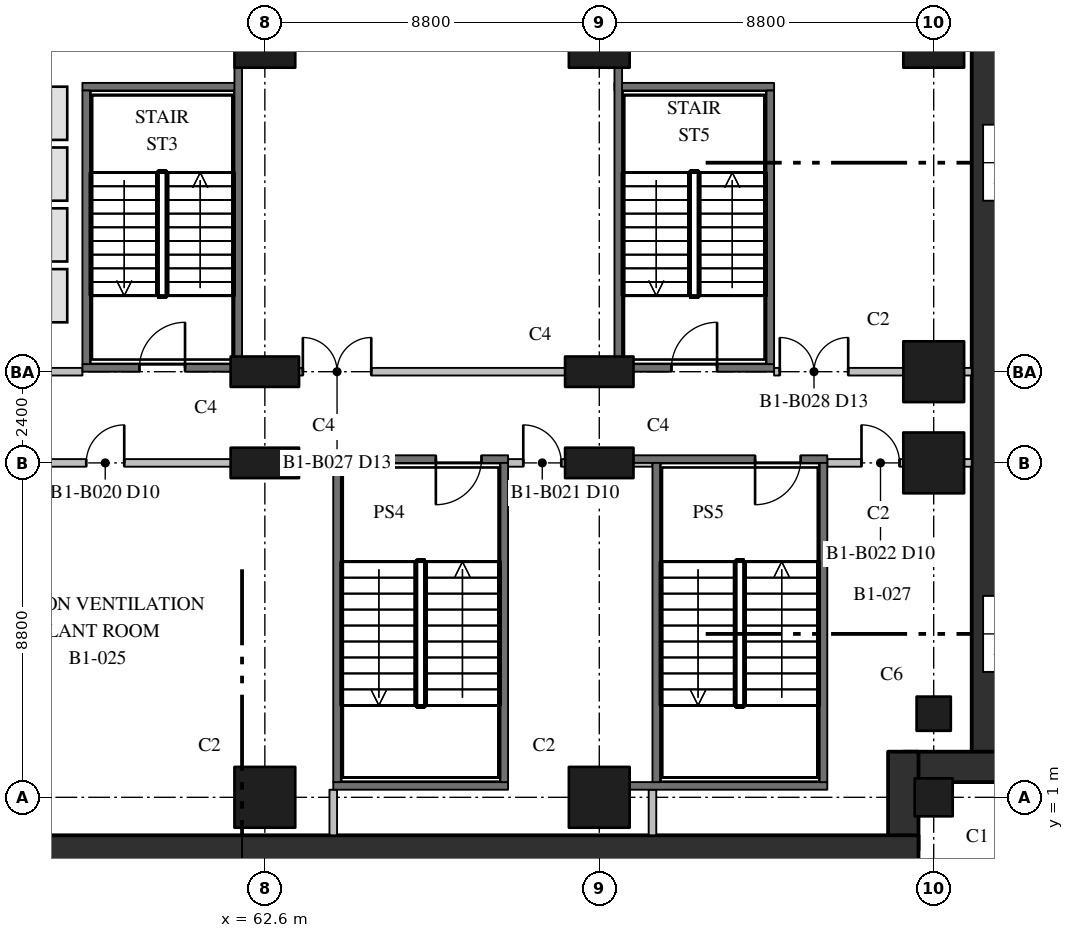
"""IFC4 building model, lengths in metres.
Left out: names, types, materials, properties, quantities, classifications, styles, units other than length and angle.
Written with IfcOpenShell. Run it as: python <this file> out.ifc"""

import sys

from ifc_helpers import new_model, si_unit, direction, frame, frame_2d, origin, origin_2d, place, context, subcontext, project, spatial, rectangle, extrude, element, fill, save


model = new_model("IFC4")
c1 = context("Model", 3, precision=1e-05, world=origin(), true_north=direction((0.0, 1.0)))
c2 = subcontext(c1, "Body", "Model", "MODEL_VIEW")
j1 = project(units=[si_unit("LENGTHUNIT", "METRE"), si_unit("PLANEANGLEUNIT", "RADIAN")], contexts=[c1])
p1 = place(None, origin())
s1 = spatial("IfcSite", under=j1, at=p1, CompositionType="ELEMENT")
p2 = place(p1, origin())
s2 = spatial("IfcBuilding", under=s1, at=p2, CompositionType="ELEMENT")
p3 = place(p2, frame((0.0, 0.0, -7.0)))
s3 = spatial("IfcBuildingStorey", under=s2, at=p3, CompositionType="ELEMENT", Elevation=-7.0)
p4 = place(p3, frame((62.6, 1.0, 0.0), z_axis=(0.0, 0.0, 1.0), x_axis=(1.0, 0.0, 0.0)))
e1 = element("IfcColumn", 1, at=p4, inside=s3, PredefinedType="COLUMN", context=c2, shape_type="SweptSolid", body=[
    extrude(rectangle(XDim=1.6, YDim=1.6, at=origin_2d()), origin(), (0.0, 0.0, 1.0), 7.0),
])
for number, where, z_axis, x_axis in (
    (2, (62.6, 9.8, 0.0), (0.0, 0.0, 1.0), (1.0, 0.0, 0.0)),
    (3, (62.6, 12.2, 0.0), (0.0, 0.0, 1.0), (1.0, 0.0, 0.0)),
):
    element("IfcColumn", number, at=place(p3, frame(where, z_axis=z_axis, x_axis=x_axis)), inside=s3, PredefinedType="COLUMN", context=c2, shape_type="SweptSolid", body=[
        extrude(rectangle(XDim=1.8, YDim=0.8, at=origin_2d()), origin(), (0.0, 0.0, 1.0), 7.0),
    ])
for number, where, z_axis, x_axis in (
    (4, (62.6, 21.0, 0.0), (0.0, 0.0, 1.0), (1.0, 0.0, 0.0)),
    (5, (71.4, 1.0, 0.0), (0.0, 0.0, 1.0), (1.0, 0.0, 0.0)),
):
    element("IfcColumn", number, at=place(p3, frame(where, z_axis=z_axis, x_axis=x_axis)), inside=s3, PredefinedType="COLUMN", context=c2, shape_type="SweptSolid", body=[
        extrude(rectangle(XDim=1.6, YDim=1.6, at=origin_2d()), origin(), (0.0, 0.0, 1.0), 7.0),
    ])
for number, where, z_axis, x_axis in (
    (6, (71.4, 9.8, 0.0), (0.0, 0.0, 1.0), (1.0, 0.0, 0.0)),
    (7, (71.4, 12.2, 0.0), (0.0, 0.0, 1.0), (1.0, 0.0, 0.0)),
):
    element("IfcColumn", number, at=place(p3, frame(where, z_axis=z_axis, x_axis=x_axis)), inside=s3, PredefinedType="COLUMN", context=c2, shape_type="SweptSolid", body=[
        extrude(rectangle(XDim=1.8, YDim=0.8, at=origin_2d()), origin(), (0.0, 0.0, 1.0), 7.0),
    ])
p5 = place(p3, frame((71.4, 21.0, 0.0), z_axis=(0.0, 0.0, 1.0), x_axis=(1.0, 0.0, 0.0)))
e8 = element("IfcColumn", 8, at=p5, inside=s3, PredefinedType="COLUMN", context=c2, shape_type="SweptSolid", body=[
    extrude(rectangle(XDim=1.6, YDim=1.6, at=origin_2d()), origin(), (0.0, 0.0, 1.0), 7.0),
])
p6 = place(p3, frame((80.2, 1.0, 0.0), z_axis=(0.0, 0.0, 1.0), x_axis=(1.0, 0.0, 0.0)))
e9 = element("IfcColumn", 9, at=p6, inside=s3, PredefinedType="COLUMN", context=c2, shape_type="SweptSolid", body=[
    extrude(rectangle(XDim=1.0, YDim=1.0, at=origin_2d()), origin(), (0.0, 0.0, 1.0), 7.0),
])
for number, where, z_axis, x_axis in (
    (10, (80.2, 9.8, 0.0), (0.0, 0.0, 1.0), (1.0, 0.0, 0.0)),
    (11, (80.2, 12.2, 0.0), (0.0, 0.0, 1.0), (1.0, 0.0, 0.0)),
    (12, (80.2, 21.0, 0.0), (0.0, 0.0, 1.0), (1.0, 0.0, 0.0)),
):
    element("IfcColumn", number, at=place(p3, frame(where, z_axis=z_axis, x_axis=x_axis)), inside=s3, PredefinedType="COLUMN", context=c2, shape_type="SweptSolid", body=[
        extrude(rectangle(XDim=1.6, YDim=1.6, at=origin_2d()), origin(), (0.0, 0.0, 1.0), 7.0),
    ])
p7 = place(p3, frame((80.2, 3.2, 0.0), z_axis=(0.0, 0.0, 1.0), x_axis=(1.0, 0.0, 0.0)))
e13 = element("IfcColumn", 13, at=p7, inside=s3, PredefinedType="COLUMN", context=c2, shape_type="SweptSolid", body=[
    extrude(rectangle(XDim=0.9, YDim=0.9, at=origin_2d()), origin(), (0.0, 0.0, 1.0), 7.0),
])
p8 = place(p3, frame((81.6, 57.4, 0.0), z_axis=(0.0, 0.0, 1.0), x_axis=(0.0, -1.0, 0.0)))
e14 = element("IfcWall", 14, at=p8, inside=s3, PredefinedType="SHEAR", context=c2, shape_type="SweptSolid", body=[
    extrude(rectangle(XDim=55.6, YDim=0.8, at=frame_2d((27.8, 0.0))), origin(), (0.0, 0.0, 1.0), 7.0),
])
p9 = place(p3, frame((82.0, 1.8, 0.0), z_axis=(0.0, 0.0, 1.0), x_axis=(-1.0, 0.0, 0.0)))
e15 = element("IfcWall", 15, at=p9, inside=s3, PredefinedType="SHEAR", context=c2, shape_type="SweptSolid", body=[
    extrude(rectangle(XDim=2.6, YDim=0.8, at=frame_2d((1.3, 0.0))), origin(), (0.0, 0.0, 1.0), 7.0),
])
p10 = place(p3, frame((79.4, 2.2, 0.0), z_axis=(0.0, 0.0, 1.0), x_axis=(0.0, -1.0, 0.0)))
e16 = element("IfcWall", 16, at=p10, inside=s3, PredefinedType="SHEAR", context=c2, shape_type="SweptSolid", body=[
    extrude(rectangle(XDim=2.6, YDim=0.8, at=frame_2d((1.3, 0.0))), origin(), (0.0, 0.0, 1.0), 7.0),
])
p11 = place(p3, frame((79.8, -0.4, 0.0), z_axis=(0.0, 0.0, 1.0), x_axis=(-1.0, 0.0, 0.0)))
e17 = element("IfcWall", 17, at=p11, inside=s3, PredefinedType="SHEAR", context=c2, shape_type="SweptSolid", body=[
    extrude(rectangle(XDim=78.0, YDim=0.8, at=frame_2d((39.0, 0.0))), origin(), (0.0, 0.0, 1.0), 7.0),
])
p12 = place(p3, frame((57.8, 12.3, 0.0), z_axis=(0.0, 0.0, 1.0), x_axis=(1.0, 0.0, 0.0)))
e18 = element("IfcWall", 18, at=p12, inside=s3, PredefinedType="SHEAR", context=c2, shape_type="SweptSolid", body=[
    extrude(rectangle(XDim=4.2, YDim=0.2, at=frame_2d((2.1, 0.0))), origin(), (0.0, 0.0, 1.0), 6.55),
])
p13 = place(p12, frame((1.5, 0.0, 0.0)))
e19 = element("IfcOpeningElement", 19, at=p13, cuts=e18, PredefinedType="OPENING", context=c2, shape_type="SweptSolid", body=[
    extrude(rectangle(XDim=1.2, YDim=2.1, at=frame_2d((0.6, 1.05))), frame((0.0, 0.11, 0.0), z_axis=(0.0, -1.0, 0.0), x_axis=(1.0, 0.0, 0.0)), (0.0, 0.0, 1.0), 0.22),
])
p14 = place(p3, frame((57.8, 19.7, 0.0), z_axis=(0.0, 0.0, 1.0), x_axis=(1.0, 0.0, 0.0)))
e20 = element("IfcWall", 20, at=p14, inside=s3, PredefinedType="SHEAR", context=c2, shape_type="SweptSolid", body=[
    extrude(rectangle(XDim=4.2, YDim=0.2, at=frame_2d((2.1, 0.0))), origin(), (0.0, 0.0, 1.0), 6.55),
])
p15 = place(p3, frame((57.9, 12.4, 0.0), z_axis=(0.0, 0.0, 1.0), x_axis=(0.0, 1.0, 0.0)))
e21 = element("IfcWall", 21, at=p15, inside=s3, PredefinedType="SHEAR", context=c2, shape_type="SweptSolid", body=[
    extrude(rectangle(XDim=7.2, YDim=0.2, at=frame_2d((3.6, 0.0))), origin(), (0.0, 0.0, 1.0), 6.55),
])
p16 = place(p3, frame((61.9, 12.4, 0.0), z_axis=(0.0, 0.0, 1.0), x_axis=(0.0, 1.0, 0.0)))
e22 = element("IfcWall", 22, at=p16, inside=s3, PredefinedType="SHEAR", context=c2, shape_type="SweptSolid", body=[
    extrude(rectangle(XDim=7.8, YDim=0.2, at=frame_2d((3.9, 0.0))), origin(), (0.0, 0.0, 1.0), 6.55),
])
p17 = place(p3, frame((71.8, 12.3, 0.0), z_axis=(0.0, 0.0, 1.0), x_axis=(1.0, 0.0, 0.0)))
e23 = element("IfcWall", 23, at=p17, inside=s3, PredefinedType="SHEAR", context=c2, shape_type="SweptSolid", body=[
    extrude(rectangle(XDim=4.2, YDim=0.2, at=frame_2d((2.1, 0.0))), origin(), (0.0, 0.0, 1.0), 6.55),
])
p18 = place(p17, frame((1.5, 0.0, 0.0)))
e24 = element("IfcOpeningElement", 24, at=p18, cuts=e23, PredefinedType="OPENING", context=c2, shape_type="SweptSolid", body=[
    extrude(rectangle(XDim=1.2, YDim=2.1, at=frame_2d((0.6, 1.05))), frame((0.0, 0.11, 0.0), z_axis=(0.0, -1.0, 0.0), x_axis=(1.0, 0.0, 0.0)), (0.0, 0.0, 1.0), 0.22),
])
p19 = place(p3, frame((71.8, 19.7, 0.0), z_axis=(0.0, 0.0, 1.0), x_axis=(1.0, 0.0, 0.0)))
e25 = element("IfcWall", 25, at=p19, inside=s3, PredefinedType="SHEAR", context=c2, shape_type="SweptSolid", body=[
    extrude(rectangle(XDim=4.2, YDim=0.2, at=frame_2d((2.1, 0.0))), origin(), (0.0, 0.0, 1.0), 6.55),
])
p20 = place(p3, frame((71.9, 12.4, 0.0), z_axis=(0.0, 0.0, 1.0), x_axis=(0.0, 1.0, 0.0)))
e26 = element("IfcWall", 26, at=p20, inside=s3, PredefinedType="SHEAR", context=c2, shape_type="SweptSolid", body=[
    extrude(rectangle(XDim=7.8, YDim=0.2, at=frame_2d((3.9, 0.0))), origin(), (0.0, 0.0, 1.0), 6.55),
])
p21 = place(p3, frame((75.9, 12.4, 0.0), z_axis=(0.0, 0.0, 1.0), x_axis=(0.0, 1.0, 0.0)))
e27 = element("IfcWall", 27, at=p21, inside=s3, PredefinedType="SHEAR", context=c2, shape_type="SweptSolid", body=[
    extrude(rectangle(XDim=7.2, YDim=0.2, at=frame_2d((3.6, 0.0))), origin(), (0.0, 0.0, 1.0), 6.55),
])
p22 = place(p3, frame((64.4, 9.9, 0.0), z_axis=(0.0, 0.0, 1.0), x_axis=(1.0, 0.0, 0.0)))
e28 = element("IfcWall", 28, at=p22, inside=s3, PredefinedType="SHEAR", context=c2, shape_type="SweptSolid", body=[
    extrude(rectangle(XDim=4.6, YDim=0.2, at=frame_2d((2.3, 0.0))), origin(), (0.0, 0.0, 1.0), 6.55),
])
p23 = place(p22, frame((2.7, 0.0, 0.0)))
e29 = element("IfcOpeningElement", 29, at=p23, cuts=e28, PredefinedType="OPENING", context=c2, shape_type="SweptSolid", body=[
    extrude(rectangle(XDim=1.2, YDim=2.1, at=frame_2d((0.6, 1.05))), frame((0.0, 0.11, 0.0), z_axis=(0.0, -1.0, 0.0), x_axis=(1.0, 0.0, 0.0)), (0.0, 0.0, 1.0), 0.22),
])
p24 = place(p3, frame((64.4, 1.3, 0.0), z_axis=(0.0, 0.0, 1.0), x_axis=(1.0, 0.0, 0.0)))
e30 = element("IfcWall", 30, at=p24, inside=s3, PredefinedType="SHEAR", context=c2, shape_type="SweptSolid", body=[
    extrude(rectangle(XDim=4.6, YDim=0.2, at=frame_2d((2.3, 0.0))), origin(), (0.0, 0.0, 1.0), 6.55),
])
for number, where, z_axis, x_axis in (
    (31, (64.5, 1.4, 0.0), (0.0, 0.0, 1.0), (0.0, 1.0, 0.0)),
    (32, (68.9, 1.4, 0.0), (0.0, 0.0, 1.0), (0.0, 1.0, 0.0)),
):
    element("IfcWall", number, at=place(p3, frame(where, z_axis=z_axis, x_axis=x_axis)), inside=s3, PredefinedType="SHEAR", context=c2, shape_type="SweptSolid", body=[
        extrude(rectangle(XDim=8.4, YDim=0.2, at=frame_2d((4.2, 0.0))), origin(), (0.0, 0.0, 1.0), 6.55),
    ])
p25 = place(p3, frame((72.3, 9.9, 0.0), z_axis=(0.0, 0.0, 1.0), x_axis=(1.0, 0.0, 0.0)))
e33 = element("IfcWall", 33, at=p25, inside=s3, PredefinedType="SHEAR", context=c2, shape_type="SweptSolid", body=[
    extrude(rectangle(XDim=5.1, YDim=0.2, at=frame_2d((2.55, 0.0))), origin(), (0.0, 0.0, 1.0), 6.55),
])
p26 = place(p25, frame((3.2, 0.0, 0.0)))
e34 = element("IfcOpeningElement", 34, at=p26, cuts=e33, PredefinedType="OPENING", context=c2, shape_type="SweptSolid", body=[
    extrude(rectangle(XDim=1.2, YDim=2.1, at=frame_2d((0.6, 1.05))), frame((0.0, 0.11, 0.0), z_axis=(0.0, -1.0, 0.0), x_axis=(1.0, 0.0, 0.0)), (0.0, 0.0, 1.0), 0.22),
])
p27 = place(p3, frame((72.2, 1.3, 0.0), z_axis=(0.0, 0.0, 1.0), x_axis=(1.0, 0.0, 0.0)))
e35 = element("IfcWall", 35, at=p27, inside=s3, PredefinedType="SHEAR", context=c2, shape_type="SweptSolid", body=[
    extrude(rectangle(XDim=5.2, YDim=0.2, at=frame_2d((2.6, 0.0))), origin(), (0.0, 0.0, 1.0), 6.55),
])
for number, where, z_axis, x_axis in (
    (36, (72.9, 1.4, 0.0), (0.0, 0.0, 1.0), (0.0, 1.0, 0.0)),
    (37, (77.3, 1.4, 0.0), (0.0, 0.0, 1.0), (0.0, 1.0, 0.0)),
):
    element("IfcWall", number, at=place(p3, frame(where, z_axis=z_axis, x_axis=x_axis)), inside=s3, PredefinedType="SHEAR", context=c2, shape_type="SweptSolid", body=[
        extrude(rectangle(XDim=8.4, YDim=0.2, at=frame_2d((4.2, 0.0))), origin(), (0.0, 0.0, 1.0), 6.55),
    ])
p28 = place(p3, frame((25.7, 12.2, 0.0), z_axis=(0.0, 0.0, 1.0), x_axis=(1.0, 0.0, 0.0)))
e38 = element("IfcWall", 38, at=p28, inside=s3, PredefinedType="PARTITIONING", context=c2, shape_type="SweptSolid", body=[
    extrude(rectangle(XDim=32.1, YDim=0.2, at=frame_2d((16.05, 0.0))), origin(), (0.0, 0.0, 1.0), 6.5),
])
p29 = place(p28, frame((16.5, 0.0, 0.0)))
e39 = element("IfcOpeningElement", 39, at=p29, cuts=e38, PredefinedType="OPENING", context=c2, shape_type="SweptSolid", body=[
    extrude(rectangle(XDim=1.8, YDim=2.1, at=frame_2d((0.9, 1.05))), frame((0.0, 0.11, 0.0), z_axis=(0.0, -1.0, 0.0), x_axis=(1.0, 0.0, 0.0)), (0.0, 0.0, 1.0), 0.22),
])
p30 = place(p28, frame((25.3, 0.0, 0.0)))
e40 = element("IfcOpeningElement", 40, at=p30, cuts=e38, PredefinedType="OPENING", context=c2, shape_type="SweptSolid", body=[
    extrude(rectangle(XDim=1.8, YDim=2.1, at=frame_2d((0.9, 1.05))), frame((0.0, 0.11, 0.0), z_axis=(0.0, -1.0, 0.0), x_axis=(1.0, 0.0, 0.0)), (0.0, 0.0, 1.0), 0.22),
])
p31 = place(p28, frame((12.8, 0.0, 0.0)))
e41 = element("IfcOpeningElement", 41, at=p31, cuts=e38, PredefinedType="OPENING", context=c2, shape_type="SweptSolid", body=[
    extrude(rectangle(XDim=1.8, YDim=2.1, at=frame_2d((0.9, 1.05))), frame((0.0, 0.11, 0.0), z_axis=(0.0, -1.0, 0.0), x_axis=(1.0, 0.0, 0.0)), (0.0, 0.0, 1.0), 0.22),
])
p32 = place(p3, frame((62.0, 12.2, 0.0), z_axis=(0.0, 0.0, 1.0), x_axis=(1.0, 0.0, 0.0)))
e42 = element("IfcWall", 42, at=p32, inside=s3, PredefinedType="PARTITIONING", context=c2, shape_type="SweptSolid", body=[
    extrude(rectangle(XDim=9.8, YDim=0.2, at=frame_2d((4.9, 0.0))), origin(), (0.0, 0.0, 1.0), 6.5),
])
p33 = place(p32, frame((1.6, 0.0, 0.0)))
e43 = element("IfcOpeningElement", 43, at=p33, cuts=e42, PredefinedType="OPENING", context=c2, shape_type="SweptSolid", body=[
    extrude(rectangle(XDim=1.8, YDim=2.1, at=frame_2d((0.9, 1.05))), frame((0.0, 0.11, 0.0), z_axis=(0.0, -1.0, 0.0), x_axis=(1.0, 0.0, 0.0)), (0.0, 0.0, 1.0), 0.22),
])
p34 = place(p3, frame((76.0, 12.2, 0.0), z_axis=(0.0, 0.0, 1.0), x_axis=(1.0, 0.0, 0.0)))
e44 = element("IfcWall", 44, at=p34, inside=s3, PredefinedType="PARTITIONING", context=c2, shape_type="SweptSolid", body=[
    extrude(rectangle(XDim=5.2, YDim=0.2, at=frame_2d((2.6, 0.0))), origin(), (0.0, 0.0, 1.0), 6.5),
])
p35 = place(p34, frame((0.15, 0.0, 0.0)))
e45 = element("IfcOpeningElement", 45, at=p35, cuts=e44, PredefinedType="OPENING", context=c2, shape_type="SweptSolid", body=[
    extrude(rectangle(XDim=1.8, YDim=2.1, at=frame_2d((0.9, 1.05))), frame((0.0, 0.11, 0.0), z_axis=(0.0, -1.0, 0.0), x_axis=(1.0, 0.0, 0.0)), (0.0, 0.0, 1.0), 0.22),
])
p36 = place(p3, frame((45.0, 9.8, 0.0), z_axis=(0.0, 0.0, 1.0), x_axis=(1.0, 0.0, 0.0)))
e46 = element("IfcWall", 46, at=p36, inside=s3, PredefinedType="PARTITIONING", context=c2, shape_type="SweptSolid", body=[
    extrude(rectangle(XDim=19.4, YDim=0.2, at=frame_2d((9.7, 0.0))), origin(), (0.0, 0.0, 1.0), 6.5),
])
p37 = place(p36, frame((3.2, 0.0, 0.0)))
e47 = element("IfcOpeningElement", 47, at=p37, cuts=e46, PredefinedType="OPENING", context=c2, shape_type="SweptSolid", body=[
    extrude(rectangle(XDim=1.0, YDim=2.1, at=frame_2d((0.5, 1.05))), frame((0.0, 0.11, 0.0), z_axis=(0.0, -1.0, 0.0), x_axis=(1.0, 0.0, 0.0)), (0.0, 0.0, 1.0), 0.22),
])
p38 = place(p36, frame((12.9, 0.0, 0.0)))
e48 = element("IfcOpeningElement", 48, at=p38, cuts=e46, PredefinedType="OPENING", context=c2, shape_type="SweptSolid", body=[
    extrude(rectangle(XDim=1.0, YDim=2.1, at=frame_2d((0.5, 1.05))), frame((0.0, 0.11, 0.0), z_axis=(0.0, -1.0, 0.0), x_axis=(1.0, 0.0, 0.0)), (0.0, 0.0, 1.0), 0.22),
])
p39 = place(p3, frame((69.0, 9.8, 0.0), z_axis=(0.0, 0.0, 1.0), x_axis=(1.0, 0.0, 0.0)))
e49 = element("IfcWall", 49, at=p39, inside=s3, PredefinedType="PARTITIONING", context=c2, shape_type="SweptSolid", body=[
    extrude(rectangle(XDim=3.8, YDim=0.2, at=frame_2d((1.9, 0.0))), origin(), (0.0, 0.0, 1.0), 6.5),
])
p40 = place(p39, frame((0.4, 0.0, 0.0)))
e50 = element("IfcOpeningElement", 50, at=p40, cuts=e49, PredefinedType="OPENING", context=c2, shape_type="SweptSolid", body=[
    extrude(rectangle(XDim=1.0, YDim=2.1, at=frame_2d((0.5, 1.05))), frame((0.0, 0.11, 0.0), z_axis=(0.0, -1.0, 0.0), x_axis=(1.0, 0.0, 0.0)), (0.0, 0.0, 1.0), 0.22),
])
p41 = place(p3, frame((77.4, 9.8, 0.0), z_axis=(0.0, 0.0, 1.0), x_axis=(1.0, 0.0, 0.0)))
e51 = element("IfcWall", 51, at=p41, inside=s3, PredefinedType="PARTITIONING", context=c2, shape_type="SweptSolid", body=[
    extrude(rectangle(XDim=3.8, YDim=0.2, at=frame_2d((1.9, 0.0))), origin(), (0.0, 0.0, 1.0), 6.5),
])
p42 = place(p41, frame((0.9, 0.0, 0.0)))
e52 = element("IfcOpeningElement", 52, at=p42, cuts=e51, PredefinedType="OPENING", context=c2, shape_type="SweptSolid", body=[
    extrude(rectangle(XDim=1.0, YDim=2.1, at=frame_2d((0.5, 1.05))), frame((0.0, 0.11, 0.0), z_axis=(0.0, -1.0, 0.0), x_axis=(1.0, 0.0, 0.0)), (0.0, 0.0, 1.0), 0.22),
])
for number, where, z_axis, x_axis in (
    (53, (64.4, 0.0, 0.0), (0.0, 0.0, 1.0), (0.0, 1.0, 0.0)),
    (54, (72.8, 0.0, 0.0), (0.0, 0.0, 1.0), (0.0, 1.0, 0.0)),
):
    element("IfcWall", number, at=place(p3, frame(where, z_axis=z_axis, x_axis=x_axis)), inside=s3, PredefinedType="PARTITIONING", context=c2, shape_type="SweptSolid", body=[
        extrude(rectangle(XDim=1.2, YDim=0.2, at=frame_2d((0.6, 0.0))), origin(), (0.0, 0.0, 1.0), 6.5),
    ])
p43 = place(p13, origin())
e55 = element("IfcDoor", 55, at=p43, inside=s3, OperationType="SINGLE_SWING_RIGHT", PredefinedType="DOOR", context=c2, shape_type="SweptSolid", body=[
    extrude(rectangle(XDim=1.2, YDim=2.1, at=frame_2d((0.6, 1.05))), frame((0.0, 0.025, 0.0), z_axis=(0.0, -1.0, 0.0), x_axis=(1.0, 0.0, 0.0)), (0.0, 0.0, 1.0), 0.05),
])
fill(e19, e55)
p44 = place(p18, origin())
e56 = element("IfcDoor", 56, at=p44, inside=s3, OperationType="SINGLE_SWING_RIGHT", PredefinedType="DOOR", context=c2, shape_type="SweptSolid", body=[
    extrude(rectangle(XDim=1.2, YDim=2.1, at=frame_2d((0.6, 1.05))), frame((0.0, 0.025, 0.0), z_axis=(0.0, -1.0, 0.0), x_axis=(1.0, 0.0, 0.0)), (0.0, 0.0, 1.0), 0.05),
])
fill(e24, e56)
p45 = place(p23, frame((1.2, 0.0, 0.0), z_axis=(0.0, 0.0, 1.0), x_axis=(-1.0, 0.0, 0.0)))
e57 = element("IfcDoor", 57, at=p45, inside=s3, OperationType="SINGLE_SWING_LEFT", PredefinedType="DOOR", context=c2, shape_type="SweptSolid", body=[
    extrude(rectangle(XDim=1.2, YDim=2.1, at=frame_2d((0.6, 1.05))), frame((0.0, 0.025, 0.0), z_axis=(0.0, -1.0, 0.0), x_axis=(1.0, 0.0, 0.0)), (0.0, 0.0, 1.0), 0.05),
])
fill(e29, e57)
p46 = place(p26, frame((1.2, 0.0, 0.0), z_axis=(0.0, 0.0, 1.0), x_axis=(-1.0, 0.0, 0.0)))
e58 = element("IfcDoor", 58, at=p46, inside=s3, OperationType="SINGLE_SWING_LEFT", PredefinedType="DOOR", context=c2, shape_type="SweptSolid", body=[
    extrude(rectangle(XDim=1.2, YDim=2.1, at=frame_2d((0.6, 1.05))), frame((0.0, 0.025, 0.0), z_axis=(0.0, -1.0, 0.0), x_axis=(1.0, 0.0, 0.0)), (0.0, 0.0, 1.0), 0.05),
])
fill(e34, e58)
p47 = place(p38, origin())
e59 = element("IfcDoor", 59, at=p47, inside=s3, OperationType="SINGLE_SWING_RIGHT", PredefinedType="DOOR", context=c2, shape_type="SweptSolid", body=[
    extrude(rectangle(XDim=1.0, YDim=2.1, at=frame_2d((0.5, 1.05))), frame((0.0, 0.025, 0.0), z_axis=(0.0, -1.0, 0.0), x_axis=(1.0, 0.0, 0.0)), (0.0, 0.0, 1.0), 0.05),
])
fill(e48, e59)
p48 = place(p40, origin())
e60 = element("IfcDoor", 60, at=p48, inside=s3, OperationType="SINGLE_SWING_LEFT", PredefinedType="DOOR", context=c2, shape_type="SweptSolid", body=[
    extrude(rectangle(XDim=1.0, YDim=2.1, at=frame_2d((0.5, 1.05))), frame((0.0, 0.025, 0.0), z_axis=(0.0, -1.0, 0.0), x_axis=(1.0, 0.0, 0.0)), (0.0, 0.0, 1.0), 0.05),
])
fill(e50, e60)
p49 = place(p42, origin())
e61 = element("IfcDoor", 61, at=p49, inside=s3, OperationType="SINGLE_SWING_LEFT", PredefinedType="DOOR", context=c2, shape_type="SweptSolid", body=[
    extrude(rectangle(XDim=1.0, YDim=2.1, at=frame_2d((0.5, 1.05))), frame((0.0, 0.025, 0.0), z_axis=(0.0, -1.0, 0.0), x_axis=(1.0, 0.0, 0.0)), (0.0, 0.0, 1.0), 0.05),
])
fill(e52, e61)
p50 = place(p33, origin())
e62 = element("IfcDoor", 62, at=p50, inside=s3, OperationType="DOUBLE_DOOR_SINGLE_SWING", PredefinedType="DOOR", context=c2, shape_type="SweptSolid", body=[
    extrude(rectangle(XDim=1.8, YDim=2.1, at=frame_2d((0.9, 1.05))), frame((0.0, 0.025, 0.0), z_axis=(0.0, -1.0, 0.0), x_axis=(1.0, 0.0, 0.0)), (0.0, 0.0, 1.0), 0.05),
])
fill(e43, e62)
p51 = place(p35, origin())
e63 = element("IfcDoor", 63, at=p51, inside=s3, OperationType="DOUBLE_DOOR_SINGLE_SWING", PredefinedType="DOOR", context=c2, shape_type="SweptSolid", body=[
    extrude(rectangle(XDim=1.8, YDim=2.1, at=frame_2d((0.9, 1.05))), frame((0.0, 0.025, 0.0), z_axis=(0.0, -1.0, 0.0), x_axis=(1.0, 0.0, 0.0)), (0.0, 0.0, 1.0), 0.05),
])
fill(e45, e63)
save(model, sys.argv[1])
